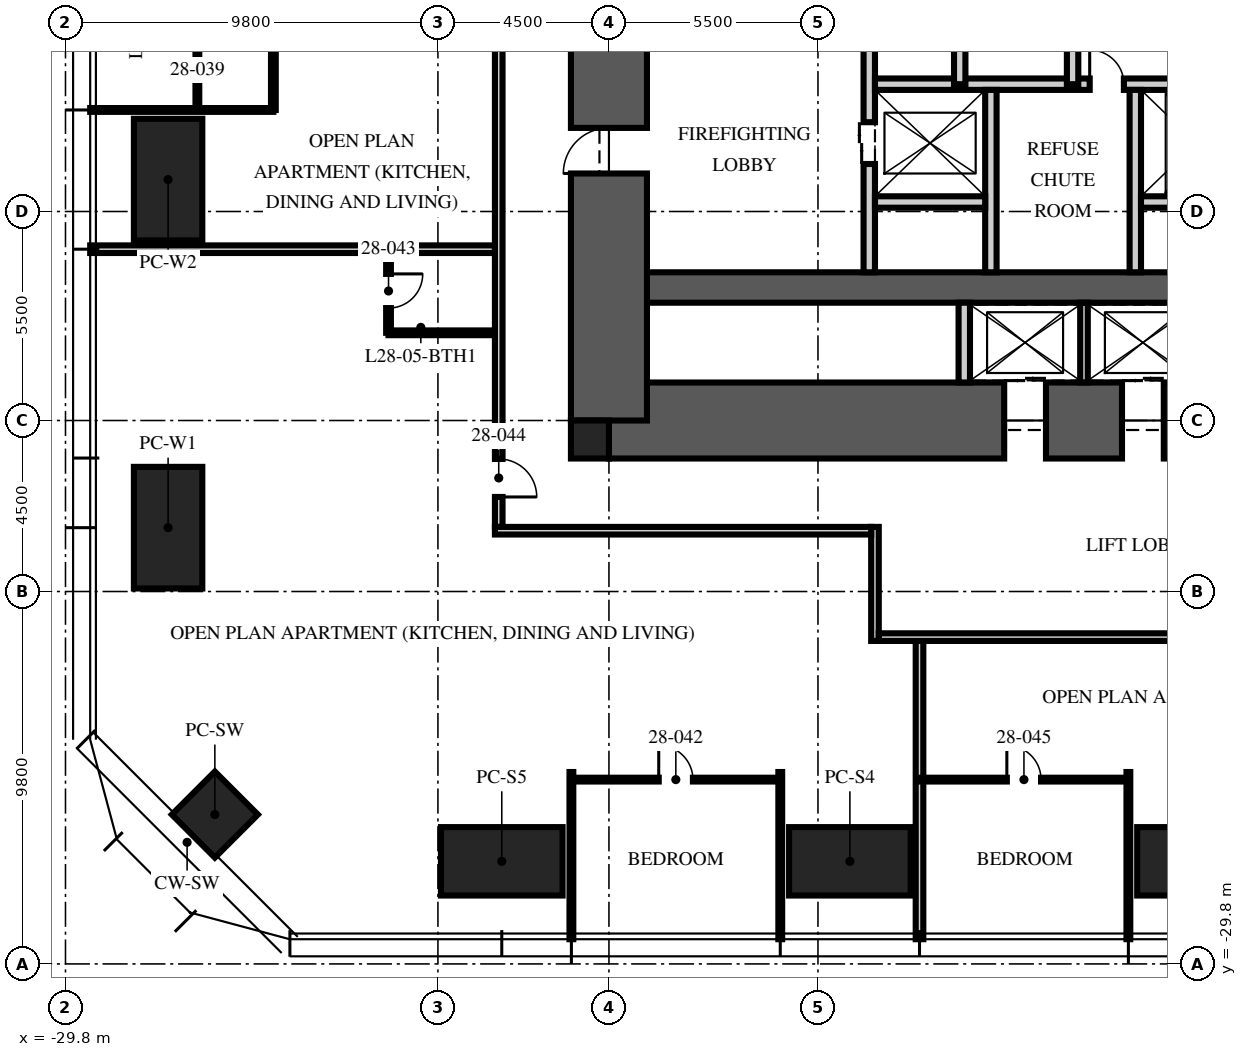
"""IFC4 building model, lengths in metres.
Left out: names, types, materials, properties, quantities, classifications, styles, units other than length and angle.
Written with IfcOpenShell. Run it as: python <this file> out.ifc"""

import sys

from ifc_helpers import new_model, si_unit, direction, frame, frame_2d, origin, origin_2d, place, context, subcontext, project, spatial, rectangle, hollow_rectangle, extrude, element, fill, save


model = new_model("IFC4")
c1 = context("Model", 3, precision=1e-05, world=origin(), true_north=direction((0.0, 1.0)))
c2 = subcontext(c1, "Body", "Model", "MODEL_VIEW")
j1 = project(units=[si_unit("LENGTHUNIT", "METRE"), si_unit("PLANEANGLEUNIT", "RADIAN")], contexts=[c1])
p1 = place(None, origin())
s1 = spatial("IfcSite", under=j1, at=p1, CompositionType="ELEMENT")
p2 = place(p1, origin())
s2 = spatial("IfcBuilding", under=s1, at=p2, CompositionType="ELEMENT")
p3 = place(p2, frame((0.0, 0.0, 114.75)))
s3 = spatial("IfcBuildingStorey", under=s2, at=p3, CompositionType="ELEMENT", Elevation=114.75)
p4 = place(p3, frame((-15.5, -15.5, -0.25), z_axis=(0.0, 0.0, 1.0), x_axis=(1.0, 0.0, 0.0)))
e1 = element("IfcWall", 1, at=p4, inside=s3, PredefinedType="SHEAR", context=c2, shape_type="SweptSolid", body=[
    extrude(rectangle(XDim=31.0, YDim=2.0, at=frame_2d((15.5, 0.0))), origin(), (0.0, 0.0, 1.0), 3.75),
])
p5 = place(p4, frame((10.4, 0.0, 0.25)))
e2 = element("IfcOpeningElement", 2, at=p5, cuts=e1, PredefinedType="OPENING", context=c2, shape_type="SweptSolid", body=[
    extrude(rectangle(XDim=1.1, YDim=2.1, at=frame_2d((0.55, 1.05))), frame((0.0, 1.01, 0.0), z_axis=(0.0, -1.0, 0.0), x_axis=(1.0, 0.0, 0.0)), (0.0, 0.0, 1.0), 2.02),
])
p6 = place(p4, frame((13.5, 0.0, 0.25)))
e3 = element("IfcOpeningElement", 3, at=p6, cuts=e1, PredefinedType="OPENING", context=c2, shape_type="SweptSolid", body=[
    extrude(rectangle(XDim=1.1, YDim=2.1, at=frame_2d((0.55, 1.05))), frame((0.0, 1.01, 0.0), z_axis=(0.0, -1.0, 0.0), x_axis=(1.0, 0.0, 0.0)), (0.0, 0.0, 1.0), 2.02),
])
p7 = place(p4, frame((16.6, 0.0, 0.25)))
e4 = element("IfcOpeningElement", 4, at=p7, cuts=e1, PredefinedType="OPENING", context=c2, shape_type="SweptSolid", body=[
    extrude(rectangle(XDim=1.1, YDim=2.1, at=frame_2d((0.55, 1.05))), frame((0.0, 1.01, 0.0), z_axis=(0.0, -1.0, 0.0), x_axis=(1.0, 0.0, 0.0)), (0.0, 0.0, 1.0), 2.02),
])
p8 = place(p3, frame((-15.5, -12.0, -0.25), z_axis=(0.0, 0.0, 1.0), x_axis=(1.0, 0.0, 0.0)))
e5 = element("IfcWall", 5, at=p8, inside=s3, PredefinedType="SHEAR", context=c2, shape_type="SweptSolid", body=[
    extrude(rectangle(XDim=31.0, YDim=0.8, at=frame_2d((15.5, 0.0))), origin(), (0.0, 0.0, 1.0), 3.75),
])
p9 = place(p3, frame((-15.5, -15.5, -0.25), z_axis=(0.0, 0.0, 1.0), x_axis=(0.0, 1.0, 0.0)))
e6 = element("IfcWall", 6, at=p9, inside=s3, PredefinedType="SHEAR", context=c2, shape_type="SweptSolid", body=[
    extrude(rectangle(XDim=31.0, YDim=2.0, at=frame_2d((15.5, 0.0))), origin(), (0.0, 0.0, 1.0), 3.75),
])
p10 = place(p9, frame((6.5, 0.0, 0.25)))
e7 = element("IfcOpeningElement", 7, at=p10, cuts=e6, PredefinedType="OPENING", context=c2, shape_type="SweptSolid", body=[
    extrude(rectangle(XDim=1.2, YDim=2.1, at=frame_2d((0.6, 1.05))), frame((0.0, 1.01, 0.0), z_axis=(0.0, -1.0, 0.0), x_axis=(1.0, 0.0, 0.0)), (0.0, 0.0, 1.0), 2.02),
])
p11 = place(p9, frame((23.0, 0.0, 0.25)))
e8 = element("IfcOpeningElement", 8, at=p11, cuts=e6, PredefinedType="OPENING", context=c2, shape_type="SweptSolid", body=[
    extrude(rectangle(XDim=1.8, YDim=2.1, at=frame_2d((0.9, 1.05))), frame((0.0, 1.01, 0.0), z_axis=(0.0, -1.0, 0.0), x_axis=(1.0, 0.0, 0.0)), (0.0, 0.0, 1.0), 2.02),
])
p12 = place(p3, frame((-16.0, -16.0, -0.25), z_axis=(0.0, 0.0, 1.0), x_axis=(1.0, 0.0, 0.0)))
e9 = element("IfcColumn", 9, at=p12, inside=s3, PredefinedType="COLUMN", context=c2, shape_type="SweptSolid", body=[
    extrude(rectangle(XDim=1.0, YDim=1.0, at=origin_2d()), origin(), (0.0, 0.0, 1.0), 3.75),
])
for number, where, z_axis, x_axis in (
    (10, (0.0, -27.1, 0.0), (0.0, 0.0, 1.0), (1.0, 0.0, 0.0)),
    (11, (-9.16, -27.1, 0.0), (0.0, 0.0, 1.0), (1.0, 0.0, 0.0)),
    (12, (-18.32, -27.1, 0.0), (0.0, 0.0, 1.0), (1.0, 0.0, 0.0)),
    (13, (-27.1, -18.32, 0.0), (0.0, 0.0, 1.0), (0.0, 1.0, 0.0)),
    (14, (-27.1, -9.16, 0.0), (0.0, 0.0, 1.0), (0.0, 1.0, 0.0)),
):
    element("IfcColumn", number, at=place(p3, frame(where, z_axis=z_axis, x_axis=x_axis)), inside=s3, PredefinedType="COLUMN", context=c2, shape_type="SweptSolid", body=[
        extrude(hollow_rectangle(XDim=3.2, YDim=1.8, WallThickness=0.2, at=origin_2d()), origin(), (0.0, 0.0, 1.0), 3.75),
    ])
p13 = place(p3, frame((-25.87, -25.87, 0.0), z_axis=(0.0, 0.0, 1.0), x_axis=(0.707106781187, -0.707106781187, 0.0)))
e15 = element("IfcColumn", 15, at=p13, inside=s3, PredefinedType="COLUMN", context=c2, shape_type="SweptSolid", body=[
    extrude(hollow_rectangle(XDim=1.6, YDim=1.6, WallThickness=0.1, at=origin_2d()), origin(), (0.0, 0.0, 1.0), 3.75),
])
p14 = place(p3, frame((-8.65, -11.6, 0.0), z_axis=(0.0, 0.0, 1.0), x_axis=(0.0, 1.0, 0.0)))
e16 = element("IfcWall", 16, at=p14, inside=s3, PredefinedType="PARTITIONING", context=c2, shape_type="SweptSolid", body=[
    extrude(rectangle(XDim=6.7, YDim=0.3, at=frame_2d((3.35, 0.0))), origin(), (0.0, 0.0, 1.0), 3.5),
])
p15 = place(p14, frame((2.85, 0.0, 0.0)))
e17 = element("IfcOpeningElement", 17, at=p15, cuts=e16, PredefinedType="OPENING", context=c2, shape_type="SweptSolid", body=[
    extrude(rectangle(XDim=1.1, YDim=2.1, at=frame_2d((0.55, 1.05))), frame((0.0, 0.16, 0.0), z_axis=(0.0, -1.0, 0.0), x_axis=(1.0, 0.0, 0.0)), (0.0, 0.0, 1.0), 0.32),
])
p16 = place(p3, frame((-8.5, -6.65, 0.0), z_axis=(0.0, 0.0, 1.0), x_axis=(1.0, 0.0, 0.0)))
e18 = element("IfcWall", 18, at=p16, inside=s3, PredefinedType="PARTITIONING", context=c2, shape_type="SweptSolid", body=[
    extrude(rectangle(XDim=17.0, YDim=0.3, at=frame_2d((8.5, 0.0))), origin(), (0.0, 0.0, 1.0), 3.5),
])
p17 = place(p16, frame((7.8, 0.0, 0.0)))
e19 = element("IfcOpeningElement", 19, at=p17, cuts=e18, PredefinedType="OPENING", context=c2, shape_type="SweptSolid", body=[
    extrude(rectangle(XDim=1.3, YDim=2.4, at=frame_2d((0.65, 1.2))), frame((0.0, 0.16, 0.0), z_axis=(0.0, -1.0, 0.0), x_axis=(1.0, 0.0, 0.0)), (0.0, 0.0, 1.0), 0.32),
])
p18 = place(p16, frame((5.65, 0.0, 0.0)))
e20 = element("IfcOpeningElement", 20, at=p18, cuts=e18, PredefinedType="OPENING", context=c2, shape_type="SweptSolid", body=[
    extrude(rectangle(XDim=0.9, YDim=2.1, at=frame_2d((0.45, 1.05))), frame((0.0, 0.16, 0.0), z_axis=(0.0, -1.0, 0.0), x_axis=(1.0, 0.0, 0.0)), (0.0, 0.0, 1.0), 0.32),
])
p19 = place(p16, frame((10.4, 0.0, 0.0)))
e21 = element("IfcOpeningElement", 21, at=p19, cuts=e18, PredefinedType="OPENING", context=c2, shape_type="SweptSolid", body=[
    extrude(rectangle(XDim=0.9, YDim=2.1, at=frame_2d((0.45, 1.05))), frame((0.0, 0.16, 0.0), z_axis=(0.0, -1.0, 0.0), x_axis=(1.0, 0.0, 0.0)), (0.0, 0.0, 1.0), 0.32),
])
for number, where, z_axis, x_axis in (
    (22, (-5.45, -11.6, 0.0), (0.0, 0.0, 1.0), (0.0, 1.0, 0.0)),
    (23, (-1.65, -11.6, 0.0), (0.0, 0.0, 1.0), (0.0, 1.0, 0.0)),
):
    element("IfcWall", number, at=place(p3, frame(where, z_axis=z_axis, x_axis=x_axis)), inside=s3, PredefinedType="PARTITIONING", context=c2, shape_type="SweptSolid", body=[
        extrude(rectangle(XDim=4.8, YDim=0.3, at=frame_2d((2.4, 0.0))), origin(), (0.0, 0.0, 1.0), 3.5),
    ])
for number, where, z_axis, x_axis in (
    (24, (-8.5, -9.75, 0.0), (0.0, 0.0, 1.0), (1.0, 0.0, 0.0)),
    (25, (-1.5, -9.75, 0.0), (0.0, 0.0, 1.0), (1.0, 0.0, 0.0)),
):
    element("IfcWall", number, at=place(p3, frame(where, z_axis=z_axis, x_axis=x_axis)), inside=s3, PredefinedType="PARTITIONING", context=c2, shape_type="SweptSolid", body=[
        extrude(rectangle(XDim=2.9, YDim=0.3, at=frame_2d((1.45, 0.0))), origin(), (0.0, 0.0, 1.0), 3.5),
    ])
p20 = place(p3, frame((-6.15, -14.5, 0.0), z_axis=(0.0, 0.0, 1.0), x_axis=(0.0, 1.0, 0.0)))
e26 = element("IfcWall", 26, at=p20, inside=s3, PredefinedType="PARTITIONING", context=c2, shape_type="SweptSolid", body=[
    extrude(rectangle(XDim=2.1, YDim=0.3, at=frame_2d((1.05, 0.0))), origin(), (0.0, 0.0, 1.0), 3.5),
])
p21 = place(p3, frame((-3.0, -14.5, 0.0), z_axis=(0.0, 0.0, 1.0), x_axis=(0.0, 1.0, 0.0)))
e27 = element("IfcWall", 27, at=p21, inside=s3, PredefinedType="PARTITIONING", context=c2, shape_type="SweptSolid", body=[
    extrude(rectangle(XDim=2.1, YDim=0.2, at=frame_2d((1.05, 0.0))), origin(), (0.0, 0.0, 1.0), 3.5),
])
p22 = place(p3, frame((-3.3, -6.65, 0.0), z_axis=(0.0, 0.0, 1.0), x_axis=(0.0, 1.0, 0.0)))
e28 = element("IfcWall", 28, at=p22, inside=s3, PredefinedType="PARTITIONING", context=c2, shape_type="SweptSolid", body=[
    extrude(rectangle(XDim=7.45, YDim=0.3, at=frame_2d((3.725, 0.0))), origin(), (0.0, 0.0, 1.0), 3.5),
])
p23 = place(p22, frame((3.275, 0.0, 0.0)))
e29 = element("IfcOpeningElement", 29, at=p23, cuts=e28, PredefinedType="OPENING", context=c2, shape_type="SweptSolid", body=[
    extrude(rectangle(XDim=0.9, YDim=2.1, at=frame_2d((0.45, 1.05))), frame((0.0, 0.16, 0.0), z_axis=(0.0, -1.0, 0.0), x_axis=(1.0, 0.0, 0.0)), (0.0, 0.0, 1.0), 0.32),
])
p24 = place(p3, frame((-6.27, -6.65, 0.0), z_axis=(0.0, 0.0, 1.0), x_axis=(0.0, 1.0, 0.0)))
e30 = element("IfcWall", 30, at=p24, inside=s3, PredefinedType="PARTITIONING", context=c2, shape_type="SweptSolid", body=[
    extrude(rectangle(XDim=7.45, YDim=0.3, at=frame_2d((3.725, 0.0))), origin(), (0.0, 0.0, 1.0), 3.5),
])
p25 = place(p3, frame((-24.33, -7.328, 0.0), z_axis=(0.0, 0.0, 1.0), x_axis=(-1.0, 0.0, 0.0)))
e31 = element("IfcWall", 31, at=p25, inside=s3, PredefinedType="PARTITIONING", context=c2, shape_type="SweptSolid", body=[
    extrude(rectangle(XDim=4.82, YDim=0.1, at=frame_2d((2.41, 0.0))), origin(), (0.0, 0.0, 1.0), 2.81),
])
p26 = place(p3, frame((-18.5, -10.992, 0.0), z_axis=(0.0, 0.0, 1.0), x_axis=(-1.0, 0.0, 0.0)))
e32 = element("IfcWall", 32, at=p26, inside=s3, PredefinedType="PARTITIONING", context=c2, shape_type="SweptSolid", body=[
    extrude(rectangle(XDim=10.65, YDim=0.2, at=frame_2d((5.325, 0.0))), origin(), (0.0, 0.0, 1.0), 2.81),
])
for number, where, z_axis, x_axis in (
    (33, (-16.488, -24.75, 0.0), (0.0, 0.0, 1.0), (0.0, -1.0, 0.0)),
    (34, (-10.992, -24.75, 0.0), (0.0, 0.0, 1.0), (0.0, -1.0, 0.0)),
):
    element("IfcWall", number, at=place(p3, frame(where, z_axis=z_axis, x_axis=x_axis)), inside=s3, PredefinedType="PARTITIONING", context=c2, shape_type="SweptSolid", body=[
        extrude(rectangle(XDim=4.4, YDim=0.1, at=frame_2d((2.2, 0.0))), origin(), (0.0, 0.0, 1.0), 2.81),
    ])
p27 = place(p3, frame((-7.328, -21.3, 0.0), z_axis=(0.0, 0.0, 1.0), x_axis=(0.0, -1.0, 0.0)))
e35 = element("IfcWall", 35, at=p27, inside=s3, PredefinedType="PARTITIONING", context=c2, shape_type="SweptSolid", body=[
    extrude(rectangle(XDim=7.85, YDim=0.2, at=frame_2d((3.925, 0.0))), origin(), (0.0, 0.0, 1.0), 2.81),
])
p28 = place(p3, frame((-1.832, -24.75, 0.0), z_axis=(0.0, 0.0, 1.0), x_axis=(0.0, -1.0, 0.0)))
e36 = element("IfcWall", 36, at=p28, inside=s3, PredefinedType="PARTITIONING", context=c2, shape_type="SweptSolid", body=[
    extrude(rectangle(XDim=4.4, YDim=0.1, at=frame_2d((2.2, 0.0))), origin(), (0.0, 0.0, 1.0), 2.81),
])
p29 = place(p3, frame((-26.33, -1.832, 0.0), z_axis=(0.0, 0.0, 1.0), x_axis=(0.0, -1.0, 0.0)))
e37 = element("IfcWall", 37, at=p29, inside=s3, PredefinedType="PARTITIONING", context=c2, shape_type="SweptSolid", body=[
    extrude(rectangle(XDim=5.496, YDim=0.1, at=frame_2d((2.748, 0.0))), origin(), (0.0, 0.0, 1.0), 2.81),
])
p30 = place(p29, frame((0.15, 0.0, 0.0)))
e38 = element("IfcOpeningElement", 38, at=p30, cuts=e37, PredefinedType="OPENING", context=c2, shape_type="SweptSolid", body=[
    extrude(rectangle(XDim=0.9, YDim=2.1, at=frame_2d((0.45, 1.05))), frame((0.0, 0.06, 0.0), z_axis=(0.0, -1.0, 0.0), x_axis=(1.0, 0.0, 0.0)), (0.0, 0.0, 1.0), 0.12),
])
p31 = place(p29, frame((2.898, 0.0, 0.0)))
e39 = element("IfcOpeningElement", 39, at=p31, cuts=e37, PredefinedType="OPENING", context=c2, shape_type="SweptSolid", body=[
    extrude(rectangle(XDim=0.9, YDim=2.1, at=frame_2d((0.45, 1.05))), frame((0.0, 0.06, 0.0), z_axis=(0.0, -1.0, 0.0), x_axis=(1.0, 0.0, 0.0)), (0.0, 0.0, 1.0), 0.12),
])
p32 = place(p3, frame((-24.33, -3.032, 0.0), z_axis=(0.0, 0.0, 1.0), x_axis=(0.0, -1.0, 0.0)))
e40 = element("IfcWall", 40, at=p32, inside=s3, PredefinedType="PARTITIONING", context=c2, shape_type="SweptSolid", body=[
    extrude(rectangle(XDim=4.296, YDim=0.125, at=frame_2d((2.148, 0.0))), origin(), (0.0, 0.0, 1.0), 2.81),
])
p33 = place(p3, frame((-16.488, -24.95, 0.0), z_axis=(0.0, 0.0, 1.0), x_axis=(1.0, 0.0, 0.0)))
e41 = element("IfcWall", 41, at=p33, inside=s3, PredefinedType="PARTITIONING", context=c2, shape_type="SweptSolid", body=[
    extrude(rectangle(XDim=5.496, YDim=0.1, at=frame_2d((2.748, 0.0))), origin(), (0.0, 0.0, 1.0), 2.81),
])
p34 = place(p33, frame((2.298, 0.0, 0.0)))
e42 = element("IfcOpeningElement", 42, at=p34, cuts=e41, PredefinedType="OPENING", context=c2, shape_type="SweptSolid", body=[
    extrude(rectangle(XDim=0.9, YDim=2.1, at=frame_2d((0.45, 1.05))), frame((0.0, 0.06, 0.0), z_axis=(0.0, -1.0, 0.0), x_axis=(1.0, 0.0, 0.0)), (0.0, 0.0, 1.0), 0.12),
])
p35 = place(p3, frame((-21.3, -10.992, 0.0), z_axis=(0.0, 0.0, 1.0), x_axis=(0.0, -1.0, 0.0)))
e43 = element("IfcWall", 43, at=p35, inside=s3, PredefinedType="PARTITIONING", context=c2, shape_type="SweptSolid", body=[
    extrude(rectangle(XDim=2.2, YDim=0.125, at=frame_2d((1.1, 0.0))), origin(), (0.0, 0.0, 1.0), 3.5),
])
p36 = place(p35, frame((0.65, 0.0, 0.0)))
e44 = element("IfcOpeningElement", 44, at=p36, cuts=e43, PredefinedType="OPENING", context=c2, shape_type="SweptSolid", body=[
    extrude(rectangle(XDim=0.9, YDim=2.1, at=frame_2d((0.45, 1.05))), frame((0.0, 0.073, 0.0), z_axis=(0.0, -1.0, 0.0), x_axis=(1.0, 0.0, 0.0)), (0.0, 0.0, 1.0), 0.145),
])
p37 = place(p3, frame((-18.5, -13.192, 0.0), z_axis=(0.0, 0.0, 1.0), x_axis=(-1.0, 0.0, 0.0)))
e45 = element("IfcWall", 45, at=p37, inside=s3, PredefinedType="PARTITIONING", context=c2, shape_type="SweptSolid", body=[
    extrude(rectangle(XDim=2.8, YDim=0.125, at=frame_2d((1.4, 0.0))), origin(), (0.0, 0.0, 1.0), 3.5),
])
p38 = place(p3, frame((-7.328, -24.95, 0.0), z_axis=(0.0, 0.0, 1.0), x_axis=(1.0, 0.0, 0.0)))
e46 = element("IfcWall", 46, at=p38, inside=s3, PredefinedType="PARTITIONING", context=c2, shape_type="SweptSolid", body=[
    extrude(rectangle(XDim=5.496, YDim=0.1, at=frame_2d((2.748, 0.0))), origin(), (0.0, 0.0, 1.0), 2.81),
])
p39 = place(p38, frame((2.298, 0.0, 0.0)))
e47 = element("IfcOpeningElement", 47, at=p39, cuts=e46, PredefinedType="OPENING", context=c2, shape_type="SweptSolid", body=[
    extrude(rectangle(XDim=0.9, YDim=2.1, at=frame_2d((0.45, 1.05))), frame((0.0, 0.06, 0.0), z_axis=(0.0, -1.0, 0.0), x_axis=(1.0, 0.0, 0.0)), (0.0, 0.0, 1.0), 0.12),
])
p40 = place(p3, frame((-18.4, 5.328, 0.0), z_axis=(0.0, 0.0, 1.0), x_axis=(0.0, -1.0, 0.0)))
e48 = element("IfcWall", 48, at=p40, inside=s3, PredefinedType="PARTITIONING", context=c2, shape_type="SweptSolid", body=[
    extrude(rectangle(XDim=23.628, YDim=0.2, at=frame_2d((11.814, 0.0))), origin(), (0.0, 0.0, 1.0), 2.3),
])
p41 = place(p40, frame((21.84, 0.0, 0.0)))
e49 = element("IfcOpeningElement", 49, at=p41, cuts=e48, PredefinedType="OPENING", context=c2, shape_type="SweptSolid", body=[
    extrude(rectangle(XDim=1.0, YDim=2.2, at=frame_2d((0.5, 1.1))), frame((0.0, 0.11, 0.0), z_axis=(0.0, -1.0, 0.0), x_axis=(1.0, 0.0, 0.0)), (0.0, 0.0, 1.0), 0.22),
])
p42 = place(p3, frame((-8.5, -18.3, 0.0), z_axis=(0.0, 0.0, 1.0), x_axis=(0.0, -1.0, 0.0)))
e50 = element("IfcWall", 50, at=p42, inside=s3, PredefinedType="PARTITIONING", context=c2, shape_type="SweptSolid", body=[
    extrude(rectangle(XDim=3.0, YDim=0.2, at=frame_2d((1.5, 0.0))), origin(), (0.0, 0.0, 1.0), 3.5),
])
p43 = place(p3, frame((5.4, -21.2, 0.0), z_axis=(0.0, 0.0, 1.0), x_axis=(-1.0, 0.0, 0.0)))
e51 = element("IfcWall", 51, at=p43, inside=s3, PredefinedType="PARTITIONING", context=c2, shape_type="SweptSolid", body=[
    extrude(rectangle(XDim=13.8, YDim=0.2, at=frame_2d((6.9, 0.0))), origin(), (0.0, 0.0, 1.0), 2.7),
])
p44 = place(p43, frame((0.958, 0.0, 0.0)))
e52 = element("IfcOpeningElement", 52, at=p44, cuts=e51, PredefinedType="OPENING", context=c2, shape_type="SweptSolid", body=[
    extrude(rectangle(XDim=1.0, YDim=2.2, at=frame_2d((0.5, 1.1))), frame((0.0, 0.11, 0.0), z_axis=(0.0, -1.0, 0.0), x_axis=(1.0, 0.0, 0.0)), (0.0, 0.0, 1.0), 0.22),
])
p45 = place(p3, frame((-8.6, -18.4, 0.0), z_axis=(0.0, 0.0, 1.0), x_axis=(-1.0, 0.0, 0.0)))
e53 = element("IfcWall", 53, at=p45, inside=s3, PredefinedType="PARTITIONING", context=c2, shape_type="SweptSolid", body=[
    extrude(rectangle(XDim=9.9, YDim=0.2, at=frame_2d((4.95, 0.0))), origin(), (0.0, 0.0, 1.0), 2.3),
])
p46 = place(p10, origin())
e54 = element("IfcDoor", 54, at=p46, inside=s3, OperationType="SINGLE_SWING_LEFT", PredefinedType="DOOR", context=c2, shape_type="SweptSolid", body=[
    extrude(rectangle(XDim=1.2, YDim=2.1, at=frame_2d((0.6, 1.05))), frame((0.0, 0.025, 0.0), z_axis=(0.0, -1.0, 0.0), x_axis=(1.0, 0.0, 0.0)), (0.0, 0.0, 1.0), 0.05),
])
fill(e7, e54)
p47 = place(p15, origin())
e55 = element("IfcDoor", 55, at=p47, inside=s3, OperationType="DOUBLE_DOOR_SLIDING", PredefinedType="DOOR", context=c2, shape_type="SweptSolid", body=[
    extrude(rectangle(XDim=1.1, YDim=2.1, at=frame_2d((0.55, 1.05))), frame((0.0, 0.025, 0.0), z_axis=(0.0, -1.0, 0.0), x_axis=(1.0, 0.0, 0.0)), (0.0, 0.0, 1.0), 0.05),
])
fill(e17, e55)
p48 = place(p5, origin())
e56 = element("IfcDoor", 56, at=p48, inside=s3, OperationType="DOUBLE_DOOR_SLIDING", PredefinedType="DOOR", context=c2, shape_type="SweptSolid", body=[
    extrude(rectangle(XDim=1.1, YDim=2.1, at=frame_2d((0.55, 1.05))), frame((0.0, 0.025, 0.0), z_axis=(0.0, -1.0, 0.0), x_axis=(1.0, 0.0, 0.0)), (0.0, 0.0, 1.0), 0.05),
])
fill(e2, e56)
p49 = place(p6, origin())
e57 = element("IfcDoor", 57, at=p49, inside=s3, OperationType="DOUBLE_DOOR_SLIDING", PredefinedType="DOOR", context=c2, shape_type="SweptSolid", body=[
    extrude(rectangle(XDim=1.1, YDim=2.1, at=frame_2d((0.55, 1.05))), frame((0.0, 0.025, 0.0), z_axis=(0.0, -1.0, 0.0), x_axis=(1.0, 0.0, 0.0)), (0.0, 0.0, 1.0), 0.05),
])
fill(e3, e57)
p50 = place(p18, origin())
e58 = element("IfcDoor", 58, at=p50, inside=s3, OperationType="SINGLE_SWING_LEFT", PredefinedType="DOOR", context=c2, shape_type="SweptSolid", body=[
    extrude(rectangle(XDim=0.9, YDim=2.1, at=frame_2d((0.45, 1.05))), frame((0.0, 0.025, 0.0), z_axis=(0.0, -1.0, 0.0), x_axis=(1.0, 0.0, 0.0)), (0.0, 0.0, 1.0), 0.05),
])
fill(e20, e58)
p51 = place(p34, origin())
e59 = element("IfcDoor", 59, at=p51, inside=s3, OperationType="SINGLE_SWING_LEFT", PredefinedType="DOOR", context=c2, shape_type="SweptSolid", body=[
    extrude(rectangle(XDim=0.9, YDim=2.1, at=frame_2d((0.45, 1.05))), frame((0.0, 0.025, 0.0), z_axis=(0.0, -1.0, 0.0), x_axis=(1.0, 0.0, 0.0)), (0.0, 0.0, 1.0), 0.05),
])
fill(e42, e59)
p52 = place(p36, origin())
e60 = element("IfcDoor", 60, at=p52, inside=s3, OperationType="SINGLE_SWING_LEFT", PredefinedType="DOOR", context=c2, shape_type="SweptSolid", body=[
    extrude(rectangle(XDim=0.9, YDim=2.1, at=frame_2d((0.45, 1.05))), frame((0.0, 0.025, 0.0), z_axis=(0.0, -1.0, 0.0), x_axis=(1.0, 0.0, 0.0)), (0.0, 0.0, 1.0), 0.05),
])
fill(e44, e60)
p53 = place(p41, origin())
e61 = element("IfcDoor", 61, at=p53, inside=s3, OperationType="SINGLE_SWING_RIGHT", PredefinedType="DOOR", context=c2, shape_type="SweptSolid", body=[
    extrude(rectangle(XDim=1.0, YDim=2.2, at=frame_2d((0.5, 1.1))), frame((0.0, 0.025, 0.0), z_axis=(0.0, -1.0, 0.0), x_axis=(1.0, 0.0, 0.0)), (0.0, 0.0, 1.0), 0.05),
])
fill(e49, e61)
p54 = place(p39, origin())
e62 = element("IfcDoor", 62, at=p54, inside=s3, OperationType="SINGLE_SWING_LEFT", PredefinedType="DOOR", context=c2, shape_type="SweptSolid", body=[
    extrude(rectangle(XDim=0.9, YDim=2.1, at=frame_2d((0.45, 1.05))), frame((0.0, 0.025, 0.0), z_axis=(0.0, -1.0, 0.0), x_axis=(1.0, 0.0, 0.0)), (0.0, 0.0, 1.0), 0.05),
])
fill(e47, e62)
save(model, sys.argv[1])
